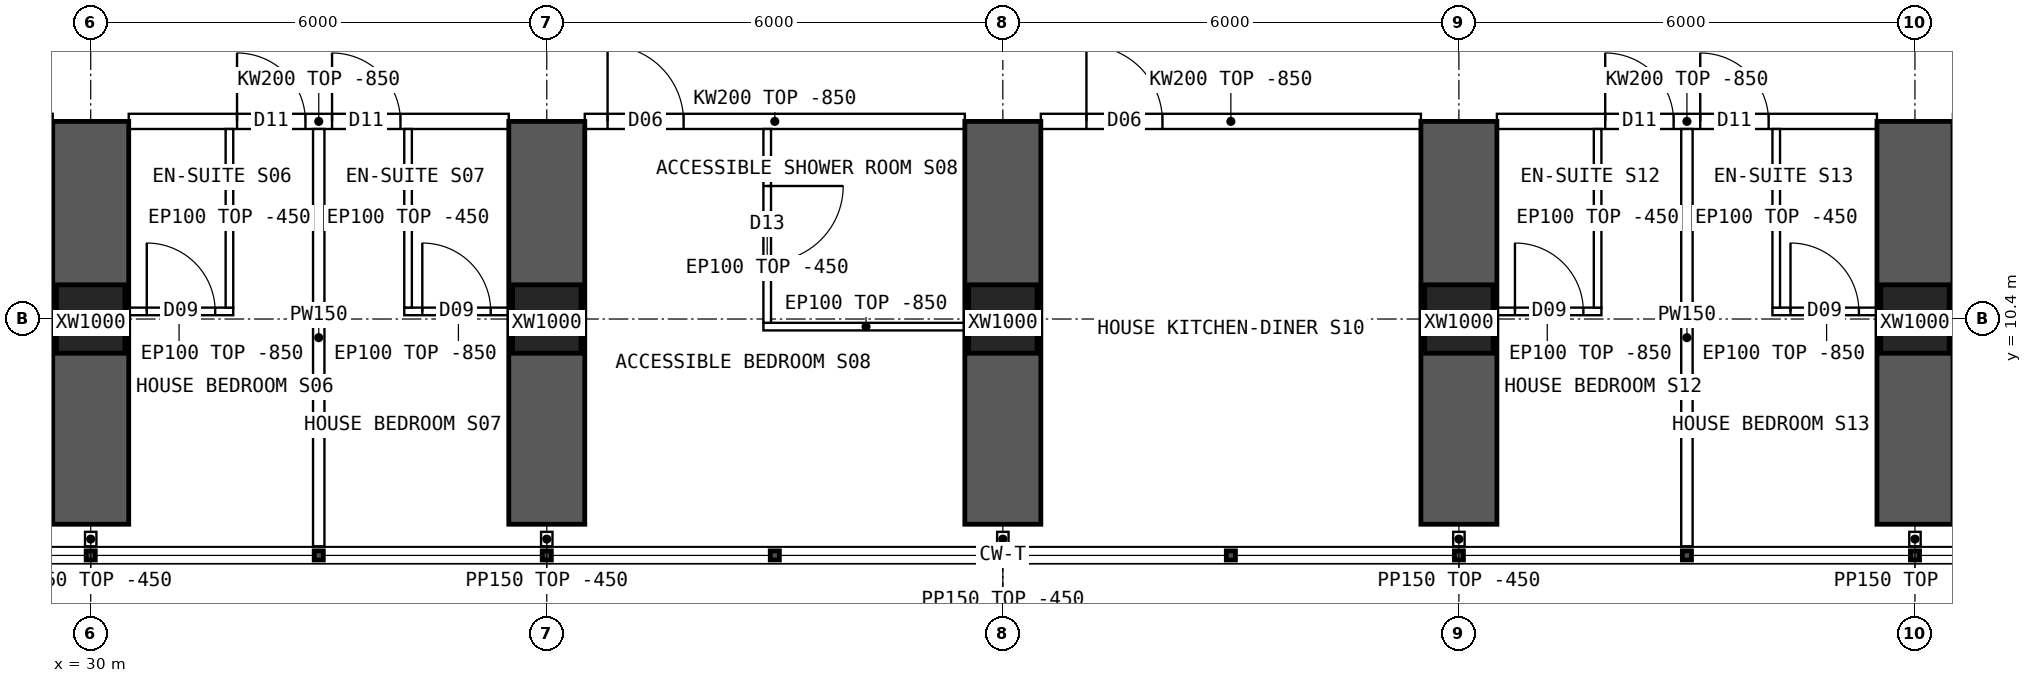
"""IFC4 building model, lengths in metres.
Left out: names, types, materials, properties, quantities, classifications, styles, units other than length and angle.
Written with IfcOpenShell. Run it as: python <this file> out.ifc"""

import sys

from ifc_helpers import new_model, si_unit, direction, frame, frame_2d, origin, origin_2d, place, context, subcontext, project, spatial, polyline, rectangle, hollow_rectangle, outline, extrude, element, fill, save


model = new_model("IFC4")
c1 = context("Model", 3, precision=1e-05, world=origin(), true_north=direction((0.0, 1.0)))
c2 = subcontext(c1, "Body", "Model", "MODEL_VIEW")
j1 = project(units=[si_unit("LENGTHUNIT", "METRE"), si_unit("PLANEANGLEUNIT", "RADIAN")], contexts=[c1])
p1 = place(None, origin())
s1 = spatial("IfcSite", under=j1, at=p1, CompositionType="ELEMENT")
p2 = place(p1, origin())
s2 = spatial("IfcBuilding", under=s1, at=p2, CompositionType="ELEMENT")
p3 = place(p2, frame((0.0, 0.0, 20.2)))
s3 = spatial("IfcBuildingStorey", under=s2, at=p3, CompositionType="ELEMENT", Elevation=20.2)
for number, where, z_axis, x_axis in (
    (1, (30.0, 10.4, 0.0), (0.0, 0.0, 1.0), (1.0, 0.0, 0.0)),
    (2, (36.0, 10.4, 0.0), (0.0, 0.0, 1.0), (1.0, 0.0, 0.0)),
    (3, (42.0, 10.4, 0.0), (0.0, 0.0, 1.0), (1.0, 0.0, 0.0)),
    (4, (48.0, 10.4, 0.0), (0.0, 0.0, 1.0), (1.0, 0.0, 0.0)),
    (5, (54.0, 10.4, 0.0), (0.0, 0.0, 1.0), (1.0, 0.0, 0.0)),
):
    element("IfcColumn", number, at=place(p3, frame(where, z_axis=z_axis, x_axis=x_axis)), inside=s3, PredefinedType="COLUMN", context=c2, shape_type="SweptSolid", body=[
        extrude(hollow_rectangle(XDim=0.9, YDim=0.9, WallThickness=0.09, at=origin_2d()), origin(), (0.0, 0.0, 1.0), 3.75),
    ])
for number, where, z_axis, x_axis in (
    (6, (30.0, 7.7, 0.0), (0.0, 0.0, 1.0), (0.0, 1.0, 0.0)),
    (7, (36.0, 7.7, 0.0), (0.0, 0.0, 1.0), (0.0, 1.0, 0.0)),
    (8, (42.0, 7.7, 0.0), (0.0, 0.0, 1.0), (0.0, 1.0, 0.0)),
    (9, (48.0, 7.7, 0.0), (0.0, 0.0, 1.0), (0.0, 1.0, 0.0)),
    (10, (54.0, 7.7, 0.0), (0.0, 0.0, 1.0), (0.0, 1.0, 0.0)),
):
    element("IfcWall", number, at=place(p3, frame(where, z_axis=z_axis, x_axis=x_axis)), inside=s3, PredefinedType="SHEAR", context=c2, shape_type="SweptSolid", body=[
        extrude(rectangle(XDim=5.3, YDim=1.0, at=frame_2d((2.65, 0.0))), origin(), (0.0, 0.0, 1.0), 3.75),
    ])
p4 = place(p3, frame((30.5, 13.0, 0.0), z_axis=(0.0, 0.0, 1.0), x_axis=(1.0, 0.0, 0.0)))
e11 = element("IfcWall", 11, at=p4, inside=s3, PredefinedType="SOLIDWALL", context=c2, shape_type="SweptSolid", body=[
    extrude(outline(polyline([(0.0, 0.0), (5.0, 0.0), (5.0, 2.9), (0.0, 2.9), (0.0, 0.0)])), frame((0.0, 0.1, 0.0), z_axis=(0.0, -1.0, 0.0), x_axis=(1.0, 0.0, 0.0)), (0.0, 0.0, 1.0), 0.2),
])
p5 = place(p4, frame((1.425, 0.0, 0.0)))
e12 = element("IfcOpeningElement", 12, at=p5, cuts=e11, PredefinedType="OPENING", context=c2, shape_type="SweptSolid", body=[
    extrude(rectangle(XDim=0.9, YDim=2.1, at=frame_2d((0.45, 1.05))), frame((0.0, 0.11, 0.0), z_axis=(0.0, -1.0, 0.0), x_axis=(1.0, 0.0, 0.0)), (0.0, 0.0, 1.0), 0.22),
])
p6 = place(p4, frame((2.675, 0.0, 0.0)))
e13 = element("IfcOpeningElement", 13, at=p6, cuts=e11, PredefinedType="OPENING", context=c2, shape_type="SweptSolid", body=[
    extrude(rectangle(XDim=0.9, YDim=2.1, at=frame_2d((0.45, 1.05))), frame((0.0, 0.11, 0.0), z_axis=(0.0, -1.0, 0.0), x_axis=(1.0, 0.0, 0.0)), (0.0, 0.0, 1.0), 0.22),
])
p7 = place(p3, frame((36.5, 13.0, 0.0), z_axis=(0.0, 0.0, 1.0), x_axis=(1.0, 0.0, 0.0)))
e14 = element("IfcWall", 14, at=p7, inside=s3, PredefinedType="SOLIDWALL", context=c2, shape_type="SweptSolid", body=[
    extrude(outline(polyline([(0.0, 0.0), (5.0, 0.0), (5.0, 2.9), (0.0, 2.9), (0.0, 0.0)])), frame((0.0, 0.1, 0.0), z_axis=(0.0, -1.0, 0.0), x_axis=(1.0, 0.0, 0.0)), (0.0, 0.0, 1.0), 0.2),
])
p8 = place(p7, frame((0.3, 0.0, 0.0)))
e15 = element("IfcOpeningElement", 15, at=p8, cuts=e14, PredefinedType="OPENING", context=c2, shape_type="SweptSolid", body=[
    extrude(rectangle(XDim=1.0, YDim=2.1, at=frame_2d((0.5, 1.05))), frame((0.0, 0.11, 0.0), z_axis=(0.0, -1.0, 0.0), x_axis=(1.0, 0.0, 0.0)), (0.0, 0.0, 1.0), 0.22),
])
p9 = place(p3, frame((42.5, 13.0, 0.0), z_axis=(0.0, 0.0, 1.0), x_axis=(1.0, 0.0, 0.0)))
e16 = element("IfcWall", 16, at=p9, inside=s3, PredefinedType="SOLIDWALL", context=c2, shape_type="SweptSolid", body=[
    extrude(outline(polyline([(0.0, 0.0), (5.0, 0.0), (5.0, 2.9), (0.0, 2.9), (0.0, 0.0)])), frame((0.0, 0.1, 0.0), z_axis=(0.0, -1.0, 0.0), x_axis=(1.0, 0.0, 0.0)), (0.0, 0.0, 1.0), 0.2),
])
p10 = place(p9, frame((0.6, 0.0, 0.0)))
e17 = element("IfcOpeningElement", 17, at=p10, cuts=e16, PredefinedType="OPENING", context=c2, shape_type="SweptSolid", body=[
    extrude(rectangle(XDim=1.0, YDim=2.1, at=frame_2d((0.5, 1.05))), frame((0.0, 0.11, 0.0), z_axis=(0.0, -1.0, 0.0), x_axis=(1.0, 0.0, 0.0)), (0.0, 0.0, 1.0), 0.22),
])
p11 = place(p3, frame((48.5, 13.0, 0.0), z_axis=(0.0, 0.0, 1.0), x_axis=(1.0, 0.0, 0.0)))
e18 = element("IfcWall", 18, at=p11, inside=s3, PredefinedType="SOLIDWALL", context=c2, shape_type="SweptSolid", body=[
    extrude(outline(polyline([(0.0, 0.0), (5.0, 0.0), (5.0, 2.9), (0.0, 2.9), (0.0, 0.0)])), frame((0.0, 0.1, 0.0), z_axis=(0.0, -1.0, 0.0), x_axis=(1.0, 0.0, 0.0)), (0.0, 0.0, 1.0), 0.2),
])
p12 = place(p11, frame((1.425, 0.0, 0.0)))
e19 = element("IfcOpeningElement", 19, at=p12, cuts=e18, PredefinedType="OPENING", context=c2, shape_type="SweptSolid", body=[
    extrude(rectangle(XDim=0.9, YDim=2.1, at=frame_2d((0.45, 1.05))), frame((0.0, 0.11, 0.0), z_axis=(0.0, -1.0, 0.0), x_axis=(1.0, 0.0, 0.0)), (0.0, 0.0, 1.0), 0.22),
])
p13 = place(p11, frame((2.675, 0.0, 0.0)))
e20 = element("IfcOpeningElement", 20, at=p13, cuts=e18, PredefinedType="OPENING", context=c2, shape_type="SweptSolid", body=[
    extrude(rectangle(XDim=0.9, YDim=2.1, at=frame_2d((0.45, 1.05))), frame((0.0, 0.11, 0.0), z_axis=(0.0, -1.0, 0.0), x_axis=(1.0, 0.0, 0.0)), (0.0, 0.0, 1.0), 0.22),
])
p14 = place(p3, frame((33.0, 7.41, 0.0), z_axis=(0.0, 0.0, 1.0), x_axis=(0.0, 1.0, 0.0)))
e21 = element("IfcWall", 21, at=p14, inside=s3, PredefinedType="PARTITIONING", context=c2, shape_type="SweptSolid", body=[
    extrude(outline(polyline([(0.0, 0.0), (5.49, 0.0), (5.49, 2.9), (5.442, 2.9), (5.44, 3.3), (3.192, 3.3), (3.19, 2.9), (2.792, 2.9), (2.79, 3.3), (0.0, 3.3), (0.0, 0.0)])), frame((0.0, 0.075, 0.0), z_axis=(0.0, -1.0, 0.0), x_axis=(1.0, 0.0, 0.0)), (0.0, 0.0, 1.0), 0.15),
])
p15 = place(p3, frame((31.875, 10.5, 0.0), z_axis=(0.0, 0.0, 1.0), x_axis=(-1.0, 0.0, 0.0)))
e22 = element("IfcWall", 22, at=p15, inside=s3, PredefinedType="PARTITIONING", context=c2, shape_type="SweptSolid", body=[
    extrude(outline(polyline([(0.0, 0.0), (1.425, 0.0), (1.425, 2.9), (0.0, 2.9), (0.0, 0.0)])), frame((0.0, 0.05, 0.0), z_axis=(0.0, -1.0, 0.0), x_axis=(1.0, 0.0, 0.0)), (0.0, 0.0, 1.0), 0.1),
])
p16 = place(p15, frame((0.238, 0.0, 0.0)))
e23 = element("IfcOpeningElement", 23, at=p16, cuts=e22, PredefinedType="OPENING", context=c2, shape_type="SweptSolid", body=[
    extrude(rectangle(XDim=0.9, YDim=2.1, at=frame_2d((0.45, 1.05))), frame((0.0, 0.06, 0.0), z_axis=(0.0, -1.0, 0.0), x_axis=(1.0, 0.0, 0.0)), (0.0, 0.0, 1.0), 0.12),
])
p17 = place(p3, frame((31.825, 10.55, 0.0), z_axis=(0.0, 0.0, 1.0), x_axis=(0.0, 1.0, 0.0)))
e24 = element("IfcWall", 24, at=p17, inside=s3, PredefinedType="PARTITIONING", context=c2, shape_type="SweptSolid", body=[
    extrude(outline(polyline([(0.0, 0.0), (2.35, 0.0), (2.35, 2.9), (2.302, 2.9), (2.3, 3.3), (0.052, 3.3), (0.05, 2.9), (0.0, 2.9), (0.0, 0.0)])), frame((0.0, 0.05, 0.0), z_axis=(0.0, -1.0, 0.0), x_axis=(1.0, 0.0, 0.0)), (0.0, 0.0, 1.0), 0.1),
])
p18 = place(p3, frame((35.55, 10.5, 0.0), z_axis=(0.0, 0.0, 1.0), x_axis=(-1.0, 0.0, 0.0)))
e25 = element("IfcWall", 25, at=p18, inside=s3, PredefinedType="PARTITIONING", context=c2, shape_type="SweptSolid", body=[
    extrude(outline(polyline([(0.0, 0.0), (1.425, 0.0), (1.425, 2.9), (0.0, 2.9), (0.0, 0.0)])), frame((0.0, 0.05, 0.0), z_axis=(0.0, -1.0, 0.0), x_axis=(1.0, 0.0, 0.0)), (0.0, 0.0, 1.0), 0.1),
])
p19 = place(p18, frame((0.288, 0.0, 0.0)))
e26 = element("IfcOpeningElement", 26, at=p19, cuts=e25, PredefinedType="OPENING", context=c2, shape_type="SweptSolid", body=[
    extrude(rectangle(XDim=0.9, YDim=2.1, at=frame_2d((0.45, 1.05))), frame((0.0, 0.06, 0.0), z_axis=(0.0, -1.0, 0.0), x_axis=(1.0, 0.0, 0.0)), (0.0, 0.0, 1.0), 0.12),
])
p20 = place(p3, frame((34.175, 10.55, 0.0), z_axis=(0.0, 0.0, 1.0), x_axis=(0.0, 1.0, 0.0)))
e27 = element("IfcWall", 27, at=p20, inside=s3, PredefinedType="PARTITIONING", context=c2, shape_type="SweptSolid", body=[
    extrude(outline(polyline([(0.0, 0.0), (2.35, 0.0), (2.35, 2.9), (2.302, 2.9), (2.3, 3.3), (0.052, 3.3), (0.05, 2.9), (0.0, 2.9), (0.0, 0.0)])), frame((0.0, 0.05, 0.0), z_axis=(0.0, -1.0, 0.0), x_axis=(1.0, 0.0, 0.0)), (0.0, 0.0, 1.0), 0.1),
])
p21 = place(p3, frame((38.85, 10.3, 0.0), z_axis=(0.0, 0.0, 1.0), x_axis=(1.0, 0.0, 0.0)))
e28 = element("IfcWall", 28, at=p21, inside=s3, PredefinedType="PARTITIONING", context=c2, shape_type="SweptSolid", body=[
    extrude(outline(polyline([(0.0, 0.0), (2.7, 0.0), (2.7, 2.9), (0.0, 2.9), (0.0, 0.0)])), frame((0.0, 0.05, 0.0), z_axis=(0.0, -1.0, 0.0), x_axis=(1.0, 0.0, 0.0)), (0.0, 0.0, 1.0), 0.1),
])
p22 = place(p3, frame((38.9, 10.35, 0.0), z_axis=(0.0, 0.0, 1.0), x_axis=(0.0, 1.0, 0.0)))
e29 = element("IfcWall", 29, at=p22, inside=s3, PredefinedType="PARTITIONING", context=c2, shape_type="SweptSolid", body=[
    extrude(outline(polyline([(0.0, 0.0), (2.55, 0.0), (2.55, 2.9), (2.502, 2.9), (2.5, 3.3), (0.252, 3.3), (0.25, 2.9), (0.0, 2.9), (0.0, 0.0)])), frame((0.0, 0.05, 0.0), z_axis=(0.0, -1.0, 0.0), x_axis=(1.0, 0.0, 0.0)), (0.0, 0.0, 1.0), 0.1),
])
p23 = place(p22, frame((0.8, 0.0, 0.0)))
e30 = element("IfcOpeningElement", 30, at=p23, cuts=e29, PredefinedType="OPENING", context=c2, shape_type="SweptSolid", body=[
    extrude(rectangle(XDim=1.0, YDim=2.1, at=frame_2d((0.5, 1.05))), frame((0.0, 0.06, 0.0), z_axis=(0.0, -1.0, 0.0), x_axis=(1.0, 0.0, 0.0)), (0.0, 0.0, 1.0), 0.12),
])
p24 = place(p3, frame((51.0, 7.41, 0.0), z_axis=(0.0, 0.0, 1.0), x_axis=(0.0, 1.0, 0.0)))
e31 = element("IfcWall", 31, at=p24, inside=s3, PredefinedType="PARTITIONING", context=c2, shape_type="SweptSolid", body=[
    extrude(outline(polyline([(0.0, 0.0), (5.49, 0.0), (5.49, 2.9), (5.442, 2.9), (5.44, 3.3), (3.192, 3.3), (3.19, 2.9), (2.792, 2.9), (2.79, 3.3), (0.0, 3.3), (0.0, 0.0)])), frame((0.0, 0.075, 0.0), z_axis=(0.0, -1.0, 0.0), x_axis=(1.0, 0.0, 0.0)), (0.0, 0.0, 1.0), 0.15),
])
p25 = place(p3, frame((49.875, 10.5, 0.0), z_axis=(0.0, 0.0, 1.0), x_axis=(-1.0, 0.0, 0.0)))
e32 = element("IfcWall", 32, at=p25, inside=s3, PredefinedType="PARTITIONING", context=c2, shape_type="SweptSolid", body=[
    extrude(outline(polyline([(0.0, 0.0), (1.425, 0.0), (1.425, 2.9), (0.0, 2.9), (0.0, 0.0)])), frame((0.0, 0.05, 0.0), z_axis=(0.0, -1.0, 0.0), x_axis=(1.0, 0.0, 0.0)), (0.0, 0.0, 1.0), 0.1),
])
p26 = place(p25, frame((0.238, 0.0, 0.0)))
e33 = element("IfcOpeningElement", 33, at=p26, cuts=e32, PredefinedType="OPENING", context=c2, shape_type="SweptSolid", body=[
    extrude(rectangle(XDim=0.9, YDim=2.1, at=frame_2d((0.45, 1.05))), frame((0.0, 0.06, 0.0), z_axis=(0.0, -1.0, 0.0), x_axis=(1.0, 0.0, 0.0)), (0.0, 0.0, 1.0), 0.12),
])
p27 = place(p3, frame((49.825, 10.55, 0.0), z_axis=(0.0, 0.0, 1.0), x_axis=(0.0, 1.0, 0.0)))
e34 = element("IfcWall", 34, at=p27, inside=s3, PredefinedType="PARTITIONING", context=c2, shape_type="SweptSolid", body=[
    extrude(outline(polyline([(0.0, 0.0), (2.35, 0.0), (2.35, 2.9), (2.302, 2.9), (2.3, 3.3), (0.052, 3.3), (0.05, 2.9), (0.0, 2.9), (0.0, 0.0)])), frame((0.0, 0.05, 0.0), z_axis=(0.0, -1.0, 0.0), x_axis=(1.0, 0.0, 0.0)), (0.0, 0.0, 1.0), 0.1),
])
p28 = place(p3, frame((53.55, 10.5, 0.0), z_axis=(0.0, 0.0, 1.0), x_axis=(-1.0, 0.0, 0.0)))
e35 = element("IfcWall", 35, at=p28, inside=s3, PredefinedType="PARTITIONING", context=c2, shape_type="SweptSolid", body=[
    extrude(outline(polyline([(0.0, 0.0), (1.425, 0.0), (1.425, 2.9), (0.0, 2.9), (0.0, 0.0)])), frame((0.0, 0.05, 0.0), z_axis=(0.0, -1.0, 0.0), x_axis=(1.0, 0.0, 0.0)), (0.0, 0.0, 1.0), 0.1),
])
p29 = place(p28, frame((0.288, 0.0, 0.0)))
e36 = element("IfcOpeningElement", 36, at=p29, cuts=e35, PredefinedType="OPENING", context=c2, shape_type="SweptSolid", body=[
    extrude(rectangle(XDim=0.9, YDim=2.1, at=frame_2d((0.45, 1.05))), frame((0.0, 0.06, 0.0), z_axis=(0.0, -1.0, 0.0), x_axis=(1.0, 0.0, 0.0)), (0.0, 0.0, 1.0), 0.12),
])
p30 = place(p3, frame((52.175, 10.55, 0.0), z_axis=(0.0, 0.0, 1.0), x_axis=(0.0, 1.0, 0.0)))
e37 = element("IfcWall", 37, at=p30, inside=s3, PredefinedType="PARTITIONING", context=c2, shape_type="SweptSolid", body=[
    extrude(outline(polyline([(0.0, 0.0), (2.35, 0.0), (2.35, 2.9), (2.302, 2.9), (2.3, 3.3), (0.052, 3.3), (0.05, 2.9), (0.0, 2.9), (0.0, 0.0)])), frame((0.0, 0.05, 0.0), z_axis=(0.0, -1.0, 0.0), x_axis=(1.0, 0.0, 0.0)), (0.0, 0.0, 1.0), 0.1),
])
for number, where, z_axis, x_axis in (
    (38, (30.0, 7.6, 0.0), (0.0, 0.0, 1.0), (0.0, -1.0, 0.0)),
    (39, (36.0, 7.6, 0.0), (0.0, 0.0, 1.0), (0.0, -1.0, 0.0)),
    (40, (42.0, 7.6, 0.0), (0.0, 0.0, 1.0), (0.0, -1.0, 0.0)),
    (41, (48.0, 7.6, 0.0), (0.0, 0.0, 1.0), (0.0, -1.0, 0.0)),
    (42, (54.0, 7.6, 0.0), (0.0, 0.0, 1.0), (0.0, -1.0, 0.0)),
):
    element("IfcWall", number, at=place(p3, frame(where, z_axis=z_axis, x_axis=x_axis)), inside=s3, PredefinedType="PARTITIONING", context=c2, shape_type="SweptSolid", body=[
        extrude(rectangle(XDim=0.19, YDim=0.15, at=frame_2d((0.095, 0.0))), origin(), (0.0, 0.0, 1.0), 3.3),
    ])
p31 = place(p16, origin())
e43 = element("IfcDoor", 43, at=p31, inside=s3, OperationType="SINGLE_SWING_RIGHT", PredefinedType="DOOR", context=c2, shape_type="SweptSolid", body=[
    extrude(rectangle(XDim=0.9, YDim=2.1, at=frame_2d((0.45, 1.05))), frame((0.0, 0.025, 0.0), z_axis=(0.0, -1.0, 0.0), x_axis=(1.0, 0.0, 0.0)), (0.0, 0.0, 1.0), 0.05),
])
fill(e23, e43)
p32 = place(p5, origin())
e44 = element("IfcDoor", 44, at=p32, inside=s3, OperationType="SINGLE_SWING_LEFT", PredefinedType="DOOR", context=c2, shape_type="SweptSolid", body=[
    extrude(rectangle(XDim=0.9, YDim=2.1, at=frame_2d((0.45, 1.05))), frame((0.0, 0.025, 0.0), z_axis=(0.0, -1.0, 0.0), x_axis=(1.0, 0.0, 0.0)), (0.0, 0.0, 1.0), 0.05),
])
fill(e12, e44)
p33 = place(p19, origin())
e45 = element("IfcDoor", 45, at=p33, inside=s3, OperationType="SINGLE_SWING_RIGHT", PredefinedType="DOOR", context=c2, shape_type="SweptSolid", body=[
    extrude(rectangle(XDim=0.9, YDim=2.1, at=frame_2d((0.45, 1.05))), frame((0.0, 0.025, 0.0), z_axis=(0.0, -1.0, 0.0), x_axis=(1.0, 0.0, 0.0)), (0.0, 0.0, 1.0), 0.05),
])
fill(e26, e45)
p34 = place(p6, origin())
e46 = element("IfcDoor", 46, at=p34, inside=s3, OperationType="SINGLE_SWING_LEFT", PredefinedType="DOOR", context=c2, shape_type="SweptSolid", body=[
    extrude(rectangle(XDim=0.9, YDim=2.1, at=frame_2d((0.45, 1.05))), frame((0.0, 0.025, 0.0), z_axis=(0.0, -1.0, 0.0), x_axis=(1.0, 0.0, 0.0)), (0.0, 0.0, 1.0), 0.05),
])
fill(e13, e46)
p35 = place(p23, origin())
e47 = element("IfcDoor", 47, at=p35, inside=s3, OperationType="SINGLE_SWING_RIGHT", PredefinedType="DOOR", context=c2, shape_type="SweptSolid", body=[
    extrude(rectangle(XDim=1.0, YDim=2.1, at=frame_2d((0.5, 1.05))), frame((0.0, 0.025, 0.0), z_axis=(0.0, -1.0, 0.0), x_axis=(1.0, 0.0, 0.0)), (0.0, 0.0, 1.0), 0.05),
])
fill(e30, e47)
p36 = place(p8, origin())
e48 = element("IfcDoor", 48, at=p36, inside=s3, OperationType="SINGLE_SWING_LEFT", PredefinedType="DOOR", context=c2, shape_type="SweptSolid", body=[
    extrude(rectangle(XDim=1.0, YDim=2.1, at=frame_2d((0.5, 1.05))), frame((0.0, 0.025, 0.0), z_axis=(0.0, -1.0, 0.0), x_axis=(1.0, 0.0, 0.0)), (0.0, 0.0, 1.0), 0.05),
])
fill(e15, e48)
p37 = place(p10, origin())
e49 = element("IfcDoor", 49, at=p37, inside=s3, OperationType="SINGLE_SWING_LEFT", PredefinedType="DOOR", context=c2, shape_type="SweptSolid", body=[
    extrude(rectangle(XDim=1.0, YDim=2.1, at=frame_2d((0.5, 1.05))), frame((0.0, 0.025, 0.0), z_axis=(0.0, -1.0, 0.0), x_axis=(1.0, 0.0, 0.0)), (0.0, 0.0, 1.0), 0.05),
])
fill(e17, e49)
p38 = place(p26, origin())
e50 = element("IfcDoor", 50, at=p38, inside=s3, OperationType="SINGLE_SWING_RIGHT", PredefinedType="DOOR", context=c2, shape_type="SweptSolid", body=[
    extrude(rectangle(XDim=0.9, YDim=2.1, at=frame_2d((0.45, 1.05))), frame((0.0, 0.025, 0.0), z_axis=(0.0, -1.0, 0.0), x_axis=(1.0, 0.0, 0.0)), (0.0, 0.0, 1.0), 0.05),
])
fill(e33, e50)
p39 = place(p12, origin())
e51 = element("IfcDoor", 51, at=p39, inside=s3, OperationType="SINGLE_SWING_LEFT", PredefinedType="DOOR", context=c2, shape_type="SweptSolid", body=[
    extrude(rectangle(XDim=0.9, YDim=2.1, at=frame_2d((0.45, 1.05))), frame((0.0, 0.025, 0.0), z_axis=(0.0, -1.0, 0.0), x_axis=(1.0, 0.0, 0.0)), (0.0, 0.0, 1.0), 0.05),
])
fill(e19, e51)
p40 = place(p29, origin())
e52 = element("IfcDoor", 52, at=p40, inside=s3, OperationType="SINGLE_SWING_RIGHT", PredefinedType="DOOR", context=c2, shape_type="SweptSolid", body=[
    extrude(rectangle(XDim=0.9, YDim=2.1, at=frame_2d((0.45, 1.05))), frame((0.0, 0.025, 0.0), z_axis=(0.0, -1.0, 0.0), x_axis=(1.0, 0.0, 0.0)), (0.0, 0.0, 1.0), 0.05),
])
fill(e36, e52)
p41 = place(p13, origin())
e53 = element("IfcDoor", 53, at=p41, inside=s3, OperationType="SINGLE_SWING_LEFT", PredefinedType="DOOR", context=c2, shape_type="SweptSolid", body=[
    extrude(rectangle(XDim=0.9, YDim=2.1, at=frame_2d((0.45, 1.05))), frame((0.0, 0.025, 0.0), z_axis=(0.0, -1.0, 0.0), x_axis=(1.0, 0.0, 0.0)), (0.0, 0.0, 1.0), 0.05),
])
fill(e20, e53)
save(model, sys.argv[1])
